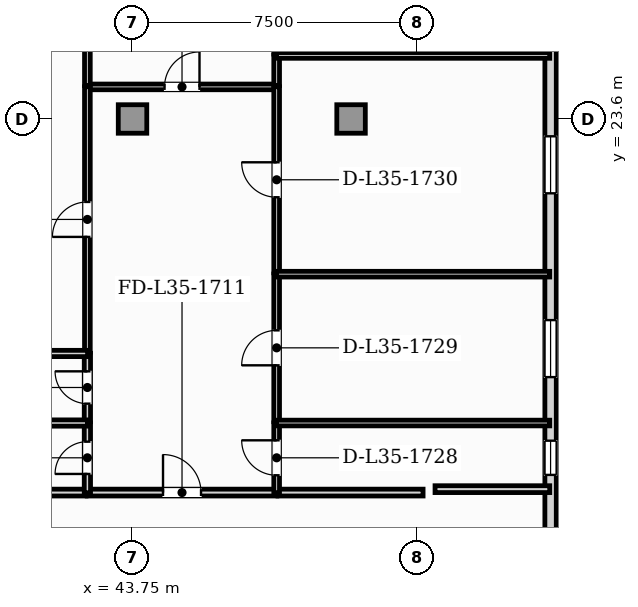
"""IFC4 building model, lengths in metres.
Left out: names, types, materials, properties, quantities, classifications, styles, units other than length and angle.
Written with IfcOpenShell. Run it as: python <this file> out.ifc"""

import sys

from ifc_helpers import new_model, si_unit, direction, frame, frame_2d, origin, origin_2d, place, context, subcontext, project, spatial, rectangle, extrude, element, fill, save


model = new_model("IFC4")
c1 = context("Model", 3, precision=1e-05, world=origin(), true_north=direction((0.0, 1.0)))
c2 = subcontext(c1, "Body", "Model", "MODEL_VIEW")
j1 = project(units=[si_unit("LENGTHUNIT", "METRE"), si_unit("PLANEANGLEUNIT", "RADIAN")], contexts=[c1])
p1 = place(None, origin())
s1 = spatial("IfcSite", under=j1, at=p1, CompositionType="ELEMENT")
p2 = place(p1, origin())
s2 = spatial("IfcBuilding", under=s1, at=p2, CompositionType="ELEMENT")
p3 = place(p2, frame((0.0, 0.0, 145.2)))
s3 = spatial("IfcBuildingStorey", under=s2, at=p3, CompositionType="ELEMENT", Elevation=145.2)
for number, where, z_axis, x_axis in (
    (1, (43.75, 23.6, 0.0), (0.0, 0.0, 1.0), (1.0, 0.0, 0.0)),
    (2, (49.5, 23.6, 0.0), (0.0, 0.0, 1.0), (1.0, 0.0, 0.0)),
):
    element("IfcColumn", number, at=place(p3, frame(where, z_axis=z_axis, x_axis=x_axis)), inside=s3, PredefinedType="COLUMN", context=c2, shape_type="SweptSolid", body=[
        extrude(rectangle(XDim=0.75, YDim=0.75, at=origin_2d()), origin(), (0.0, 0.0, 1.0), 3.85),
    ])
p4 = place(p3, frame((54.75, 3.24, 0.0), z_axis=(0.0, 0.0, 1.0), x_axis=(0.0, 1.0, 0.0)))
e3 = element("IfcWall", 3, at=p4, inside=s3, PredefinedType="SOLIDWALL", context=c2, shape_type="SweptSolid", body=[
    extrude(rectangle(XDim=36.72, YDim=0.3, at=frame_2d((18.36, 0.0))), origin(), (0.0, 0.0, 1.0), 3.63),
])
p5 = place(p4, frame((30.56, 0.0, 0.95)))
e4 = element("IfcOpeningElement", 4, at=p5, cuts=e3, PredefinedType="OPENING", context=c2, shape_type="SweptSolid", body=[
    extrude(rectangle(XDim=0.9, YDim=1.5, at=frame_2d((0.45, 0.75))), frame((0.0, 0.16, 0.0), z_axis=(0.0, -1.0, 0.0), x_axis=(1.0, 0.0, 0.0)), (0.0, 0.0, 1.0), 0.32),
])
p6 = place(p4, frame((10.995, 0.0, 0.95)))
e5 = element("IfcOpeningElement", 5, at=p6, cuts=e3, PredefinedType="OPENING", context=c2, shape_type="SweptSolid", body=[
    extrude(rectangle(XDim=0.9, YDim=1.5, at=frame_2d((0.45, 0.75))), frame((0.0, 0.16, 0.0), z_axis=(0.0, -1.0, 0.0), x_axis=(1.0, 0.0, 0.0)), (0.0, 0.0, 1.0), 0.32),
])
p7 = place(p4, frame((13.568, 0.0, 0.9)))
e6 = element("IfcOpeningElement", 6, at=p7, cuts=e3, PredefinedType="OPENING", context=c2, shape_type="SweptSolid", body=[
    extrude(rectangle(XDim=1.5, YDim=1.95, at=frame_2d((0.75, 0.975))), frame((0.0, 0.16, 0.0), z_axis=(0.0, -1.0, 0.0), x_axis=(1.0, 0.0, 0.0)), (0.0, 0.0, 1.0), 0.32),
])
p8 = place(p4, frame((18.404, 0.0, 0.9)))
e7 = element("IfcOpeningElement", 7, at=p8, cuts=e3, PredefinedType="OPENING", context=c2, shape_type="SweptSolid", body=[
    extrude(rectangle(XDim=1.5, YDim=1.95, at=frame_2d((0.75, 0.975))), frame((0.0, 0.16, 0.0), z_axis=(0.0, -1.0, 0.0), x_axis=(1.0, 0.0, 0.0)), (0.0, 0.0, 1.0), 0.32),
])
p9 = place(p4, frame((25.396, 0.0, 0.9)))
e8 = element("IfcOpeningElement", 8, at=p9, cuts=e3, PredefinedType="OPENING", context=c2, shape_type="SweptSolid", body=[
    extrude(rectangle(XDim=1.5, YDim=1.95, at=frame_2d((0.75, 0.975))), frame((0.0, 0.16, 0.0), z_axis=(0.0, -1.0, 0.0), x_axis=(1.0, 0.0, 0.0)), (0.0, 0.0, 1.0), 0.32),
])
p10 = place(p4, frame((32.834, 0.0, 0.9)))
e9 = element("IfcOpeningElement", 9, at=p10, cuts=e3, PredefinedType="OPENING", context=c2, shape_type="SweptSolid", body=[
    extrude(rectangle(XDim=1.5, YDim=1.95, at=frame_2d((0.75, 0.975))), frame((0.0, 0.16, 0.0), z_axis=(0.0, -1.0, 0.0), x_axis=(1.0, 0.0, 0.0)), (0.0, 0.0, 1.0), 0.32),
])
p11 = place(p3, frame((42.557, 13.77, 0.0), z_axis=(0.0, 0.0, 1.0), x_axis=(1.0, 0.0, 0.0)))
e10 = element("IfcWall", 10, at=p11, inside=s3, PredefinedType="PARTITIONING", context=c2, shape_type="SweptSolid", body=[
    extrude(rectangle(XDim=4.99, YDim=0.18, at=frame_2d((2.495, 0.0))), origin(), (0.0, 0.0, 1.0), 3.63),
])
p12 = place(p11, frame((1.995, 0.0, 0.0)))
e11 = element("IfcOpeningElement", 11, at=p12, cuts=e10, PredefinedType="OPENING", context=c2, shape_type="SweptSolid", body=[
    extrude(rectangle(XDim=1.0, YDim=2.15, at=frame_2d((0.5, 1.075))), frame((0.0, 0.1, 0.0), z_axis=(0.0, -1.0, 0.0), x_axis=(1.0, 0.0, 0.0)), (0.0, 0.0, 1.0), 0.2),
])
p13 = place(p3, frame((35.955, 13.77, 0.0), z_axis=(0.0, 0.0, 1.0), x_axis=(1.0, 0.0, 0.0)))
e12 = element("IfcWall", 12, at=p13, inside=s3, PredefinedType="PARTITIONING", context=c2, shape_type="SweptSolid", body=[
    extrude(rectangle(XDim=6.572, YDim=0.18, at=frame_2d((3.286, 0.0))), origin(), (0.0, 0.0, 1.0), 3.63),
])
p14 = place(p3, frame((47.577, 13.77, 0.0), z_axis=(0.0, 0.0, 1.0), x_axis=(1.0, 0.0, 0.0)))
e13 = element("IfcWall", 13, at=p14, inside=s3, PredefinedType="PARTITIONING", context=c2, shape_type="SweptSolid", body=[
    extrude(rectangle(XDim=3.818, YDim=0.18, at=frame_2d((1.909, 0.0))), origin(), (0.0, 0.0, 1.0), 3.63),
])
p15 = place(p3, frame((42.557, 24.444, 0.0), z_axis=(0.0, 0.0, 1.0), x_axis=(1.0, 0.0, 0.0)))
e14 = element("IfcWall", 14, at=p15, inside=s3, PredefinedType="PARTITIONING", context=c2, shape_type="SweptSolid", body=[
    extrude(rectangle(XDim=4.99, YDim=0.15, at=frame_2d((2.495, 0.0))), origin(), (0.0, 0.0, 1.0), 3.63),
])
p16 = place(p15, frame((2.035, 0.0, 0.0)))
e15 = element("IfcOpeningElement", 15, at=p16, cuts=e14, PredefinedType="OPENING", context=c2, shape_type="SweptSolid", body=[
    extrude(rectangle(XDim=0.92, YDim=2.1, at=frame_2d((0.46, 1.05))), frame((0.0, 0.085, 0.0), z_axis=(0.0, -1.0, 0.0), x_axis=(1.0, 0.0, 0.0)), (0.0, 0.0, 1.0), 0.17),
])
p17 = place(p3, frame((42.562, 13.765, 0.0), z_axis=(0.0, 0.0, 1.0), x_axis=(0.0, 1.0, 0.0)))
e16 = element("IfcWall", 16, at=p17, inside=s3, PredefinedType="PLUMBINGWALL", context=c2, shape_type="SweptSolid", body=[
    extrude(rectangle(XDim=1.84, YDim=0.165, at=frame_2d((0.92, 0.0))), origin(), (0.0, 0.0, 1.0), 3.63),
])
p18 = place(p17, frame((0.495, 0.0, 0.0)))
e17 = element("IfcOpeningElement", 17, at=p18, cuts=e16, PredefinedType="OPENING", context=c2, shape_type="SweptSolid", body=[
    extrude(rectangle(XDim=0.85, YDim=2.1, at=frame_2d((0.425, 1.05))), frame((0.0, 0.093, 0.0), z_axis=(0.0, -1.0, 0.0), x_axis=(1.0, 0.0, 0.0)), (0.0, 0.0, 1.0), 0.185),
])
p19 = place(p3, frame((42.562, 15.635, 0.0), z_axis=(0.0, 0.0, 1.0), x_axis=(0.0, 1.0, 0.0)))
e18 = element("IfcWall", 18, at=p19, inside=s3, PredefinedType="PLUMBINGWALL", context=c2, shape_type="SweptSolid", body=[
    extrude(rectangle(XDim=1.8, YDim=0.165, at=frame_2d((0.9, 0.0))), origin(), (0.0, 0.0, 1.0), 3.63),
])
p20 = place(p19, frame((0.475, 0.0, 0.0)))
e19 = element("IfcOpeningElement", 19, at=p20, cuts=e18, PredefinedType="OPENING", context=c2, shape_type="SweptSolid", body=[
    extrude(rectangle(XDim=0.85, YDim=2.1, at=frame_2d((0.425, 1.05))), frame((0.0, 0.093, 0.0), z_axis=(0.0, -1.0, 0.0), x_axis=(1.0, 0.0, 0.0)), (0.0, 0.0, 1.0), 0.185),
])
p21 = place(p3, frame((42.562, 17.465, 0.0), z_axis=(0.0, 0.0, 1.0), x_axis=(0.0, 1.0, 0.0)))
e20 = element("IfcWall", 20, at=p21, inside=s3, PredefinedType="PARTITIONING", context=c2, shape_type="SweptSolid", body=[
    extrude(rectangle(XDim=6.984, YDim=0.15, at=frame_2d((3.492, 0.0))), origin(), (0.0, 0.0, 1.0), 3.63),
])
p22 = place(p21, frame((3.032, 0.0, 0.0)))
e21 = element("IfcOpeningElement", 21, at=p22, cuts=e20, PredefinedType="OPENING", context=c2, shape_type="SweptSolid", body=[
    extrude(rectangle(XDim=0.92, YDim=2.1, at=frame_2d((0.46, 1.05))), frame((0.0, 0.085, 0.0), z_axis=(0.0, -1.0, 0.0), x_axis=(1.0, 0.0, 0.0)), (0.0, 0.0, 1.0), 0.17),
])
p23 = place(p3, frame((47.542, 13.765, 0.0), z_axis=(0.0, 0.0, 1.0), x_axis=(0.0, 1.0, 0.0)))
e22 = element("IfcWall", 22, at=p23, inside=s3, PredefinedType="PARTITIONING", context=c2, shape_type="SweptSolid", body=[
    extrude(rectangle(XDim=1.84, YDim=0.15, at=frame_2d((0.92, 0.0))), origin(), (0.0, 0.0, 1.0), 3.177),
])
p24 = place(p23, frame((0.46, 0.0, 0.0)))
e23 = element("IfcOpeningElement", 23, at=p24, cuts=e22, PredefinedType="OPENING", context=c2, shape_type="SweptSolid", body=[
    extrude(rectangle(XDim=0.92, YDim=2.1, at=frame_2d((0.46, 1.05))), frame((0.0, 0.085, 0.0), z_axis=(0.0, -1.0, 0.0), x_axis=(1.0, 0.0, 0.0)), (0.0, 0.0, 1.0), 0.17),
])
p25 = place(p3, frame((47.542, 15.635, 0.0), z_axis=(0.0, 0.0, 1.0), x_axis=(0.0, 1.0, 0.0)))
e24 = element("IfcWall", 24, at=p25, inside=s3, PredefinedType="PARTITIONING", context=c2, shape_type="SweptSolid", body=[
    extrude(rectangle(XDim=3.886, YDim=0.15, at=frame_2d((1.943, 0.0))), origin(), (0.0, 0.0, 1.0), 3.177),
])
p26 = place(p25, frame((1.483, 0.0, 0.0)))
e25 = element("IfcOpeningElement", 25, at=p26, cuts=e24, PredefinedType="OPENING", context=c2, shape_type="SweptSolid", body=[
    extrude(rectangle(XDim=0.92, YDim=2.1, at=frame_2d((0.46, 1.05))), frame((0.0, 0.085, 0.0), z_axis=(0.0, -1.0, 0.0), x_axis=(1.0, 0.0, 0.0)), (0.0, 0.0, 1.0), 0.17),
])
p27 = place(p3, frame((47.542, 19.552, 0.0), z_axis=(0.0, 0.0, 1.0), x_axis=(0.0, 1.0, 0.0)))
e26 = element("IfcWall", 26, at=p27, inside=s3, PredefinedType="PARTITIONING", context=c2, shape_type="SweptSolid", body=[
    extrude(rectangle(XDim=4.898, YDim=0.15, at=frame_2d((2.449, 0.0))), origin(), (0.0, 0.0, 1.0), 3.177),
])
p28 = place(p27, frame((1.989, 0.0, 0.0)))
e27 = element("IfcOpeningElement", 27, at=p28, cuts=e26, PredefinedType="OPENING", context=c2, shape_type="SweptSolid", body=[
    extrude(rectangle(XDim=0.92, YDim=2.1, at=frame_2d((0.46, 1.05))), frame((0.0, 0.085, 0.0), z_axis=(0.0, -1.0, 0.0), x_axis=(1.0, 0.0, 0.0)), (0.0, 0.0, 1.0), 0.17),
])
p29 = place(p3, frame((42.562, 24.479, 0.0), z_axis=(0.0, 0.0, 1.0), x_axis=(0.0, 1.0, 0.0)))
e28 = element("IfcWall", 28, at=p29, inside=s3, PredefinedType="PARTITIONING", context=c2, shape_type="SweptSolid", body=[
    extrude(rectangle(XDim=9.026, YDim=0.15, at=frame_2d((4.513, 0.0))), origin(), (0.0, 0.0, 1.0), 3.63),
])
p30 = place(p29, frame((5.407, 0.0, 0.0)))
e29 = element("IfcOpeningElement", 29, at=p30, cuts=e28, PredefinedType="OPENING", context=c2, shape_type="SweptSolid", body=[
    extrude(rectangle(XDim=0.92, YDim=2.1, at=frame_2d((0.46, 1.05))), frame((0.0, 0.085, 0.0), z_axis=(0.0, -1.0, 0.0), x_axis=(1.0, 0.0, 0.0)), (0.0, 0.0, 1.0), 0.17),
])
p31 = place(p3, frame((47.542, 24.479, 0.0), z_axis=(0.0, 0.0, 1.0), x_axis=(0.0, 1.0, 0.0)))
e30 = element("IfcWall", 30, at=p31, inside=s3, PredefinedType="PARTITIONING", context=c2, shape_type="SweptSolid", body=[
    extrude(rectangle(XDim=0.798, YDim=0.15, at=frame_2d((0.399, 0.0))), origin(), (0.0, 0.0, 1.0), 3.177),
])
p32 = place(p3, frame((47.542, 25.307, 0.0), z_axis=(0.0, 0.0, 1.0), x_axis=(0.0, 1.0, 0.0)))
e31 = element("IfcWall", 31, at=p32, inside=s3, PredefinedType="PARTITIONING", context=c2, shape_type="SweptSolid", body=[
    extrude(rectangle(XDim=8.198, YDim=0.15, at=frame_2d((4.099, 0.0))), origin(), (0.0, 0.0, 1.0), 3.177),
])
p33 = place(p32, frame((3.639, 0.0, 0.0)))
e32 = element("IfcOpeningElement", 32, at=p33, cuts=e31, PredefinedType="OPENING", context=c2, shape_type="SweptSolid", body=[
    extrude(rectangle(XDim=0.92, YDim=2.1, at=frame_2d((0.46, 1.05))), frame((0.0, 0.085, 0.0), z_axis=(0.0, -1.0, 0.0), x_axis=(1.0, 0.0, 0.0)), (0.0, 0.0, 1.0), 0.17),
])
for number, where, z_axis, x_axis in (
    (33, (35.955, 15.6, 0.0), (0.0, 0.0, 1.0), (1.0, 0.0, 0.0)),
    (34, (35.955, 17.43, 0.0), (0.0, 0.0, 1.0), (1.0, 0.0, 0.0)),
):
    element("IfcWall", number, at=place(p3, frame(where, z_axis=z_axis, x_axis=x_axis)), inside=s3, PredefinedType="PLUMBINGWALL", context=c2, shape_type="SweptSolid", body=[
        extrude(rectangle(XDim=6.612, YDim=0.165, at=frame_2d((3.306, 0.0))), origin(), (0.0, 0.0, 1.0), 3.63),
    ])
for number, where, z_axis, x_axis in (
    (35, (47.537, 15.6, 0.0), (0.0, 0.0, 1.0), (1.0, 0.0, 0.0)),
    (36, (47.537, 19.517, 0.0), (0.0, 0.0, 1.0), (1.0, 0.0, 0.0)),
    (37, (47.537, 25.272, 0.0), (0.0, 0.0, 1.0), (1.0, 0.0, 0.0)),
):
    element("IfcWall", number, at=place(p3, frame(where, z_axis=z_axis, x_axis=x_axis)), inside=s3, PredefinedType="PARTITIONING", context=c2, shape_type="SweptSolid", body=[
        extrude(rectangle(XDim=7.19, YDim=0.15, at=frame_2d((3.595, 0.0))), origin(), (0.0, 0.0, 1.0), 3.63),
    ])
p34 = place(p3, frame((54.728, 13.86, 0.0), z_axis=(0.0, 0.0, 1.0), x_axis=(-1.0, 0.0, 0.0)))
e38 = element("IfcWall", 38, at=p34, inside=s3, PredefinedType="PARTITIONING", context=c2, shape_type="SweptSolid", body=[
    extrude(rectangle(XDim=3.018, YDim=0.18, at=frame_2d((1.509, 0.0))), origin(), (0.0, 0.0, 1.0), 3.63),
])
p35 = place(p6, origin())
e39 = element("IfcWindow", 39, at=p35, inside=s3, PartitioningType="SINGLE_PANEL", PredefinedType="WINDOW", context=c2, shape_type="SweptSolid", body=[
    extrude(rectangle(XDim=0.9, YDim=1.5, at=frame_2d((0.45, 0.75))), frame((0.0, 0.03, 0.0), z_axis=(0.0, -1.0, 0.0), x_axis=(1.0, 0.0, 0.0)), (0.0, 0.0, 1.0), 0.06),
])
fill(e5, e39)
p36 = place(p7, origin())
e40 = element("IfcWindow", 40, at=p36, inside=s3, PartitioningType="SINGLE_PANEL", PredefinedType="WINDOW", context=c2, shape_type="SweptSolid", body=[
    extrude(rectangle(XDim=1.5, YDim=1.95, at=frame_2d((0.75, 0.975))), frame((0.0, 0.03, 0.0), z_axis=(0.0, -1.0, 0.0), x_axis=(1.0, 0.0, 0.0)), (0.0, 0.0, 1.0), 0.06),
])
fill(e6, e40)
p37 = place(p8, origin())
e41 = element("IfcWindow", 41, at=p37, inside=s3, PartitioningType="SINGLE_PANEL", PredefinedType="WINDOW", context=c2, shape_type="SweptSolid", body=[
    extrude(rectangle(XDim=1.5, YDim=1.95, at=frame_2d((0.75, 0.975))), frame((0.0, 0.03, 0.0), z_axis=(0.0, -1.0, 0.0), x_axis=(1.0, 0.0, 0.0)), (0.0, 0.0, 1.0), 0.06),
])
fill(e7, e41)
p38 = place(p12, origin())
e42 = element("IfcDoor", 42, at=p38, inside=s3, OperationType="SINGLE_SWING_LEFT", PredefinedType="DOOR", context=c2, shape_type="SweptSolid", body=[
    extrude(rectangle(XDim=1.0, YDim=2.15, at=frame_2d((0.5, 1.075))), frame((0.0, 0.025, 0.0), z_axis=(0.0, -1.0, 0.0), x_axis=(1.0, 0.0, 0.0)), (0.0, 0.0, 1.0), 0.05),
])
fill(e11, e42)
p39 = place(p16, origin())
e43 = element("IfcDoor", 43, at=p39, inside=s3, OperationType="SINGLE_SWING_RIGHT", PredefinedType="DOOR", context=c2, shape_type="SweptSolid", body=[
    extrude(rectangle(XDim=0.92, YDim=2.1, at=frame_2d((0.46, 1.05))), frame((0.0, 0.025, 0.0), z_axis=(0.0, -1.0, 0.0), x_axis=(1.0, 0.0, 0.0)), (0.0, 0.0, 1.0), 0.05),
])
fill(e15, e43)
p40 = place(p18, origin())
e44 = element("IfcDoor", 44, at=p40, inside=s3, OperationType="SINGLE_SWING_LEFT", PredefinedType="DOOR", context=c2, shape_type="SweptSolid", body=[
    extrude(rectangle(XDim=0.85, YDim=2.1, at=frame_2d((0.425, 1.05))), frame((0.0, 0.025, 0.0), z_axis=(0.0, -1.0, 0.0), x_axis=(1.0, 0.0, 0.0)), (0.0, 0.0, 1.0), 0.05),
])
fill(e17, e44)
p41 = place(p20, origin())
e45 = element("IfcDoor", 45, at=p41, inside=s3, OperationType="SINGLE_SWING_RIGHT", PredefinedType="DOOR", context=c2, shape_type="SweptSolid", body=[
    extrude(rectangle(XDim=0.85, YDim=2.1, at=frame_2d((0.425, 1.05))), frame((0.0, 0.025, 0.0), z_axis=(0.0, -1.0, 0.0), x_axis=(1.0, 0.0, 0.0)), (0.0, 0.0, 1.0), 0.05),
])
fill(e19, e45)
p42 = place(p22, origin())
e46 = element("IfcDoor", 46, at=p42, inside=s3, OperationType="SINGLE_SWING_LEFT", PredefinedType="DOOR", context=c2, shape_type="SweptSolid", body=[
    extrude(rectangle(XDim=0.92, YDim=2.1, at=frame_2d((0.46, 1.05))), frame((0.0, 0.025, 0.0), z_axis=(0.0, -1.0, 0.0), x_axis=(1.0, 0.0, 0.0)), (0.0, 0.0, 1.0), 0.05),
])
fill(e21, e46)
p43 = place(p24, origin())
e47 = element("IfcDoor", 47, at=p43, inside=s3, OperationType="SINGLE_SWING_RIGHT", PredefinedType="DOOR", context=c2, shape_type="SweptSolid", body=[
    extrude(rectangle(XDim=0.92, YDim=2.1, at=frame_2d((0.46, 1.05))), frame((0.0, 0.025, 0.0), z_axis=(0.0, -1.0, 0.0), x_axis=(1.0, 0.0, 0.0)), (0.0, 0.0, 1.0), 0.05),
])
fill(e23, e47)
p44 = place(p26, origin())
e48 = element("IfcDoor", 48, at=p44, inside=s3, OperationType="SINGLE_SWING_LEFT", PredefinedType="DOOR", context=c2, shape_type="SweptSolid", body=[
    extrude(rectangle(XDim=0.92, YDim=2.1, at=frame_2d((0.46, 1.05))), frame((0.0, 0.025, 0.0), z_axis=(0.0, -1.0, 0.0), x_axis=(1.0, 0.0, 0.0)), (0.0, 0.0, 1.0), 0.05),
])
fill(e25, e48)
p45 = place(p28, origin())
e49 = element("IfcDoor", 49, at=p45, inside=s3, OperationType="SINGLE_SWING_RIGHT", PredefinedType="DOOR", context=c2, shape_type="SweptSolid", body=[
    extrude(rectangle(XDim=0.92, YDim=2.1, at=frame_2d((0.46, 1.05))), frame((0.0, 0.025, 0.0), z_axis=(0.0, -1.0, 0.0), x_axis=(1.0, 0.0, 0.0)), (0.0, 0.0, 1.0), 0.05),
])
fill(e27, e49)
save(model, sys.argv[1])
